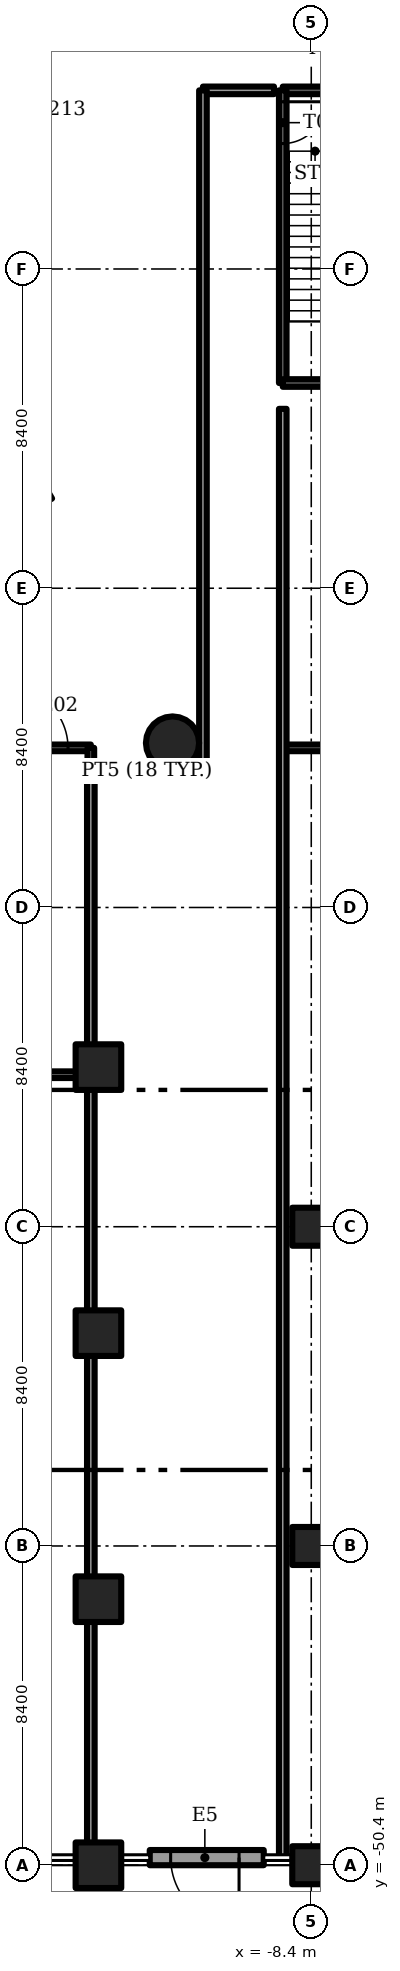
"""IFC4 building model, lengths in metres.
Left out: names, types, materials, properties, quantities, classifications, styles, units other than length and angle.
Written with IfcOpenShell. Run it as: python <this file> out.ifc"""

import sys

from ifc_helpers import new_model, si_unit, direction, frame, frame_2d, origin, origin_2d, place, context, subcontext, project, spatial, rectangle, circle, extrude, element, fill, save


model = new_model("IFC4")
c1 = context("Model", 3, precision=1e-05, world=origin(), true_north=direction((0.0, 1.0)))
c2 = subcontext(c1, "Body", "Model", "MODEL_VIEW")
j1 = project(units=[si_unit("LENGTHUNIT", "METRE"), si_unit("PLANEANGLEUNIT", "RADIAN")], contexts=[c1])
p1 = place(None, origin())
s1 = spatial("IfcSite", under=j1, at=p1, CompositionType="ELEMENT")
p2 = place(p1, origin())
s2 = spatial("IfcBuilding", under=s1, at=p2, CompositionType="ELEMENT")
p3 = place(p2, origin())
s3 = spatial("IfcBuildingStorey", under=s2, at=p3, CompositionType="ELEMENT", Elevation=0.0)
for number, where, z_axis, x_axis in (
    (1, (-8.4, -50.4, -0.35), (0.0, 0.0, 1.0), (1.0, 0.0, 0.0)),
    (2, (-8.4, -42.0, -0.35), (0.0, 0.0, 1.0), (1.0, 0.0, 0.0)),
    (3, (-8.4, -33.6, -0.35), (0.0, 0.0, 1.0), (1.0, 0.0, 0.0)),
):
    element("IfcColumn", number, at=place(p3, frame(where, z_axis=z_axis, x_axis=x_axis)), inside=s3, PredefinedType="COLUMN", context=c2, shape_type="SweptSolid", body=[
        extrude(rectangle(XDim=1.0, YDim=1.0, at=origin_2d()), origin(), (0.0, 0.0, 1.0), 6.0),
    ])
for number, where, z_axis, x_axis in (
    (4, (-14.0, -43.4, -0.35), (0.0, 0.0, 1.0), (1.0, 0.0, 0.0)),
    (5, (-14.0, -36.4, -0.35), (0.0, 0.0, 1.0), (1.0, 0.0, 0.0)),
    (6, (-14.0, -50.4, -0.35), (0.0, 0.0, 1.0), (1.0, 0.0, 0.0)),
    (7, (-14.0, -29.4, -0.35), (0.0, 0.0, 1.0), (1.0, 0.0, 0.0)),
):
    element("IfcColumn", number, at=place(p3, frame(where, z_axis=z_axis, x_axis=x_axis)), inside=s3, PredefinedType="COLUMN", context=c2, shape_type="SweptSolid", body=[
        extrude(rectangle(XDim=1.2, YDim=1.2, at=origin_2d()), origin(), (0.0, 0.0, 1.0), 6.0),
    ])
p4 = place(p3, frame((-12.051, -20.872, -0.35), z_axis=(0.0, 0.0, 1.0), x_axis=(1.0, 0.0, 0.0)))
e8 = element("IfcColumn", 8, at=p4, inside=s3, PredefinedType="COLUMN", context=c2, shape_type="SweptSolid", body=[
    extrude(circle(Radius=0.7, at=origin_2d()), origin(), (0.0, 0.0, 1.0), 5.15),
])
p5 = place(p3, frame((-9.65, -50.2, 0.0), z_axis=(0.0, 0.0, 1.0), x_axis=(-1.0, 0.0, 0.0)))
e9 = element("IfcWall", 9, at=p5, inside=s3, PredefinedType="SOLIDWALL", context=c2, shape_type="SweptSolid", body=[
    extrude(rectangle(XDim=3.0, YDim=0.4, at=frame_2d((1.5, 0.0))), origin(), (0.0, 0.0, 1.0), 5.65),
])
p6 = place(p5, frame((0.65, 0.0, 0.0)))
e10 = element("IfcOpeningElement", 10, at=p6, cuts=e9, PredefinedType="OPENING", context=c2, shape_type="SweptSolid", body=[
    extrude(rectangle(XDim=1.8, YDim=2.4, at=frame_2d((0.9, 1.2))), frame((0.0, 0.2, 0.0), z_axis=(0.0, -1.0, 0.0), x_axis=(1.0, 0.0, 0.0)), (0.0, 0.0, 1.0), 0.4),
])
p7 = place(p3, frame((-9.15, -3.7, 0.0), z_axis=(0.0, 0.0, 1.0), x_axis=(1.0, 0.0, 0.0)))
e11 = element("IfcWall", 11, at=p7, inside=s3, PredefinedType="SOLIDWALL", context=c2, shape_type="SweptSolid", body=[
    extrude(rectangle(XDim=3.35, YDim=0.2, at=frame_2d((1.675, 0.0))), origin(), (0.0, 0.0, 1.0), 5.65),
])
p8 = place(p7, frame((1.125, 0.0, 0.0)))
e12 = element("IfcOpeningElement", 12, at=p8, cuts=e11, PredefinedType="OPENING", context=c2, shape_type="SweptSolid", body=[
    extrude(rectangle(XDim=1.1, YDim=2.1, at=frame_2d((0.55, 1.05))), frame((0.0, 0.1, 0.0), z_axis=(0.0, -1.0, 0.0), x_axis=(1.0, 0.0, 0.0)), (0.0, 0.0, 1.0), 0.2),
])
p9 = place(p3, frame((-9.15, -3.7, 0.0), z_axis=(0.0, 0.0, 1.0), x_axis=(0.0, -1.0, 0.0)))
e13 = element("IfcWall", 13, at=p9, inside=s3, PredefinedType="SOLIDWALL", context=c2, shape_type="SweptSolid", body=[
    extrude(rectangle(XDim=7.7, YDim=0.2, at=frame_2d((3.85, 0.0))), origin(), (0.0, 0.0, 1.0), 5.65),
])
p10 = place(p9, frame((0.3, 0.0, 0.0)))
e14 = element("IfcOpeningElement", 14, at=p10, cuts=e13, PredefinedType="OPENING", context=c2, shape_type="SweptSolid", body=[
    extrude(rectangle(XDim=1.1, YDim=2.1, at=frame_2d((0.55, 1.05))), frame((0.0, 0.1, 0.0), z_axis=(0.0, -1.0, 0.0), x_axis=(1.0, 0.0, 0.0)), (0.0, 0.0, 1.0), 0.2),
])
p11 = place(p3, frame((-9.15, -11.4, 0.0), z_axis=(0.0, 0.0, 1.0), x_axis=(1.0, 0.0, 0.0)))
e15 = element("IfcWall", 15, at=p11, inside=s3, PredefinedType="SOLIDWALL", context=c2, shape_type="SweptSolid", body=[
    extrude(rectangle(XDim=3.35, YDim=0.2, at=frame_2d((1.675, 0.0))), origin(), (0.0, 0.0, 1.0), 5.65),
])
p12 = place(p3, frame((-24.7, -29.6, 0.0), z_axis=(0.0, 0.0, 1.0), x_axis=(1.0, 0.0, 0.0)))
e16 = element("IfcWall", 16, at=p12, inside=s3, PredefinedType="PARTITIONING", context=c2, shape_type="SweptSolid", body=[
    extrude(rectangle(XDim=10.2, YDim=0.175, at=frame_2d((5.1, 0.0))), origin(), (0.0, 0.0, 1.0), 5.65),
])
p13 = place(p12, frame((2.89, 0.0, 0.0)))
e17 = element("IfcOpeningElement", 17, at=p13, cuts=e16, PredefinedType="OPENING", context=c2, shape_type="SweptSolid", body=[
    extrude(rectangle(XDim=1.6, YDim=2.1, at=frame_2d((0.8, 1.05))), frame((0.0, 0.087, 0.0), z_axis=(0.0, -1.0, 0.0), x_axis=(1.0, 0.0, 0.0)), (0.0, 0.0, 1.0), 0.175),
])
p14 = place(p12, frame((5.71, 0.0, 0.0)))
e18 = element("IfcOpeningElement", 18, at=p14, cuts=e16, PredefinedType="OPENING", context=c2, shape_type="SweptSolid", body=[
    extrude(rectangle(XDim=1.6, YDim=2.1, at=frame_2d((0.8, 1.05))), frame((0.0, 0.087, 0.0), z_axis=(0.0, -1.0, 0.0), x_axis=(1.0, 0.0, 0.0)), (0.0, 0.0, 1.0), 0.175),
])
p15 = place(p3, frame((-41.62, -21.0, 0.0), z_axis=(0.0, 0.0, 1.0), x_axis=(1.0, 0.0, 0.0)))
e19 = element("IfcWall", 19, at=p15, inside=s3, PredefinedType="PARTITIONING", context=c2, shape_type="SweptSolid", body=[
    extrude(rectangle(XDim=27.42, YDim=0.175, at=frame_2d((13.71, 0.0))), origin(), (0.0, 0.0, 1.0), 5.65),
])
p16 = place(p15, frame((25.22, 0.0, 0.0)))
e20 = element("IfcOpeningElement", 20, at=p16, cuts=e19, PredefinedType="OPENING", context=c2, shape_type="SweptSolid", body=[
    extrude(rectangle(XDim=1.6, YDim=2.1, at=frame_2d((0.8, 1.05))), frame((0.0, 0.087, 0.0), z_axis=(0.0, -1.0, 0.0), x_axis=(1.0, 0.0, 0.0)), (0.0, 0.0, 1.0), 0.175),
])
p17 = place(p15, frame((18.67, 0.0, 0.0)))
e21 = element("IfcOpeningElement", 21, at=p17, cuts=e19, PredefinedType="OPENING", context=c2, shape_type="SweptSolid", body=[
    extrude(rectangle(XDim=0.9, YDim=2.1, at=frame_2d((0.45, 1.05))), frame((0.0, 0.087, 0.0), z_axis=(0.0, -1.0, 0.0), x_axis=(1.0, 0.0, 0.0)), (0.0, 0.0, 1.0), 0.175),
])
p18 = place(p3, frame((-9.15, -21.0, 0.0), z_axis=(0.0, 0.0, 1.0), x_axis=(1.0, 0.0, 0.0)))
e22 = element("IfcWall", 22, at=p18, inside=s3, PredefinedType="PARTITIONING", context=c2, shape_type="SweptSolid", body=[
    extrude(rectangle(XDim=18.3, YDim=0.175, at=frame_2d((9.15, 0.0))), origin(), (0.0, 0.0, 1.0), 4.8),
])
p19 = place(p18, frame((8.35, 0.0, 0.0)))
e23 = element("IfcOpeningElement", 23, at=p19, cuts=e22, PredefinedType="OPENING", context=c2, shape_type="SweptSolid", body=[
    extrude(rectangle(XDim=1.6, YDim=2.1, at=frame_2d((0.8, 1.05))), frame((0.0, 0.087, 0.0), z_axis=(0.0, -1.0, 0.0), x_axis=(1.0, 0.0, 0.0)), (0.0, 0.0, 1.0), 0.175),
])
p20 = place(p3, frame((-14.2, -21.6, 0.0), z_axis=(0.0, 0.0, 1.0), x_axis=(0.0, 1.0, 0.0)))
e24 = element("IfcWall", 24, at=p20, inside=s3, PredefinedType="PARTITIONING", context=c2, shape_type="SweptSolid", body=[
    extrude(rectangle(XDim=0.6, YDim=0.175, at=frame_2d((0.3, 0.0))), origin(), (0.0, 0.0, 1.0), 5.65),
])
p21 = place(p3, frame((-14.2, -21.6, 0.0), z_axis=(0.0, 0.0, 1.0), x_axis=(1.0, 0.0, 0.0)))
e25 = element("IfcWall", 25, at=p21, inside=s3, PredefinedType="PARTITIONING", context=c2, shape_type="SweptSolid", body=[
    extrude(rectangle(XDim=2.95, YDim=0.2, at=frame_2d((1.475, 0.0))), origin(), (0.0, 0.0, 1.0), 5.65),
])
p22 = place(p3, frame((-11.25, -3.7, 0.0), z_axis=(0.0, 0.0, 1.0), x_axis=(1.0, 0.0, 0.0)))
e26 = element("IfcWall", 26, at=p22, inside=s3, PredefinedType="PARTITIONING", context=c2, shape_type="SweptSolid", body=[
    extrude(rectangle(XDim=1.87, YDim=0.2, at=frame_2d((0.935, 0.0))), origin(), (0.0, 0.0, 1.0), 5.65),
])
for number, where, z_axis, x_axis in (
    (27, (-14.2, -49.9, 0.0), (0.0, 0.0, 1.0), (0.0, 1.0, 0.0)),
    (28, (-14.2, -42.9, 0.0), (0.0, 0.0, 1.0), (0.0, 1.0, 0.0)),
    (29, (-14.2, -35.9, 0.0), (0.0, 0.0, 1.0), (0.0, 1.0, 0.0)),
):
    element("IfcWall", number, at=place(p3, frame(where, z_axis=z_axis, x_axis=x_axis)), inside=s3, PredefinedType="PARTITIONING", context=c2, shape_type="SweptSolid", body=[
        extrude(rectangle(XDim=6.0, YDim=0.2, at=frame_2d((3.0, 0.0))), origin(), (0.0, 0.0, 1.0), 5.65),
    ])
p23 = place(p3, frame((-14.2, -28.9, 0.0), z_axis=(0.0, 0.0, 1.0), x_axis=(0.0, 1.0, 0.0)))
e30 = element("IfcWall", 30, at=p23, inside=s3, PredefinedType="PARTITIONING", context=c2, shape_type="SweptSolid", body=[
    extrude(rectangle(XDim=7.3, YDim=0.2, at=frame_2d((3.65, 0.0))), origin(), (0.0, 0.0, 1.0), 5.65),
])
p24 = place(p3, frame((-11.25, -21.6, 0.0), z_axis=(0.0, 0.0, 1.0), x_axis=(0.0, 1.0, 0.0)))
e31 = element("IfcWall", 31, at=p24, inside=s3, PredefinedType="PARTITIONING", context=c2, shape_type="SweptSolid", body=[
    extrude(rectangle(XDim=17.9, YDim=0.2, at=frame_2d((8.95, 0.0))), origin(), (0.0, 0.0, 1.0), 5.65),
])
p25 = place(p3, frame((-9.15, -50.181, 0.0), z_axis=(0.0, 0.0, 1.0), x_axis=(0.0, 1.0, 0.0)))
e32 = element("IfcWall", 32, at=p25, inside=s3, PredefinedType="PARTITIONING", context=c2, shape_type="SweptSolid", body=[
    extrude(rectangle(XDim=38.101, YDim=0.2, at=frame_2d((19.05, 0.0))), origin(), (0.0, 0.0, 1.0), 5.65),
])
p26 = place(p6, origin())
e33 = element("IfcDoor", 33, at=p26, inside=s3, OperationType="SINGLE_SWING_LEFT", PredefinedType="DOOR", context=c2, shape_type="SweptSolid", body=[
    extrude(rectangle(XDim=1.8, YDim=2.4, at=frame_2d((0.9, 1.2))), frame((0.0, 0.025, 0.0), z_axis=(0.0, -1.0, 0.0), x_axis=(1.0, 0.0, 0.0)), (0.0, 0.0, 1.0), 0.05),
])
fill(e10, e33)
p27 = place(p16, origin())
e34 = element("IfcDoor", 34, at=p27, inside=s3, OperationType="DOUBLE_DOOR_SINGLE_SWING", PredefinedType="DOOR", context=c2, shape_type="SweptSolid", body=[
    extrude(rectangle(XDim=1.6, YDim=2.1, at=frame_2d((0.8, 1.05))), frame((0.0, 0.025, 0.0), z_axis=(0.0, -1.0, 0.0), x_axis=(1.0, 0.0, 0.0)), (0.0, 0.0, 1.0), 0.05),
])
fill(e20, e34)
p28 = place(p10, origin())
e35 = element("IfcDoor", 35, at=p28, inside=s3, OperationType="SINGLE_SWING_LEFT", PredefinedType="DOOR", context=c2, shape_type="SweptSolid", body=[
    extrude(rectangle(XDim=1.1, YDim=2.1, at=frame_2d((0.55, 1.05))), frame((0.0, 0.025, 0.0), z_axis=(0.0, -1.0, 0.0), x_axis=(1.0, 0.0, 0.0)), (0.0, 0.0, 1.0), 0.05),
])
fill(e14, e35)
save(model, sys.argv[1])
